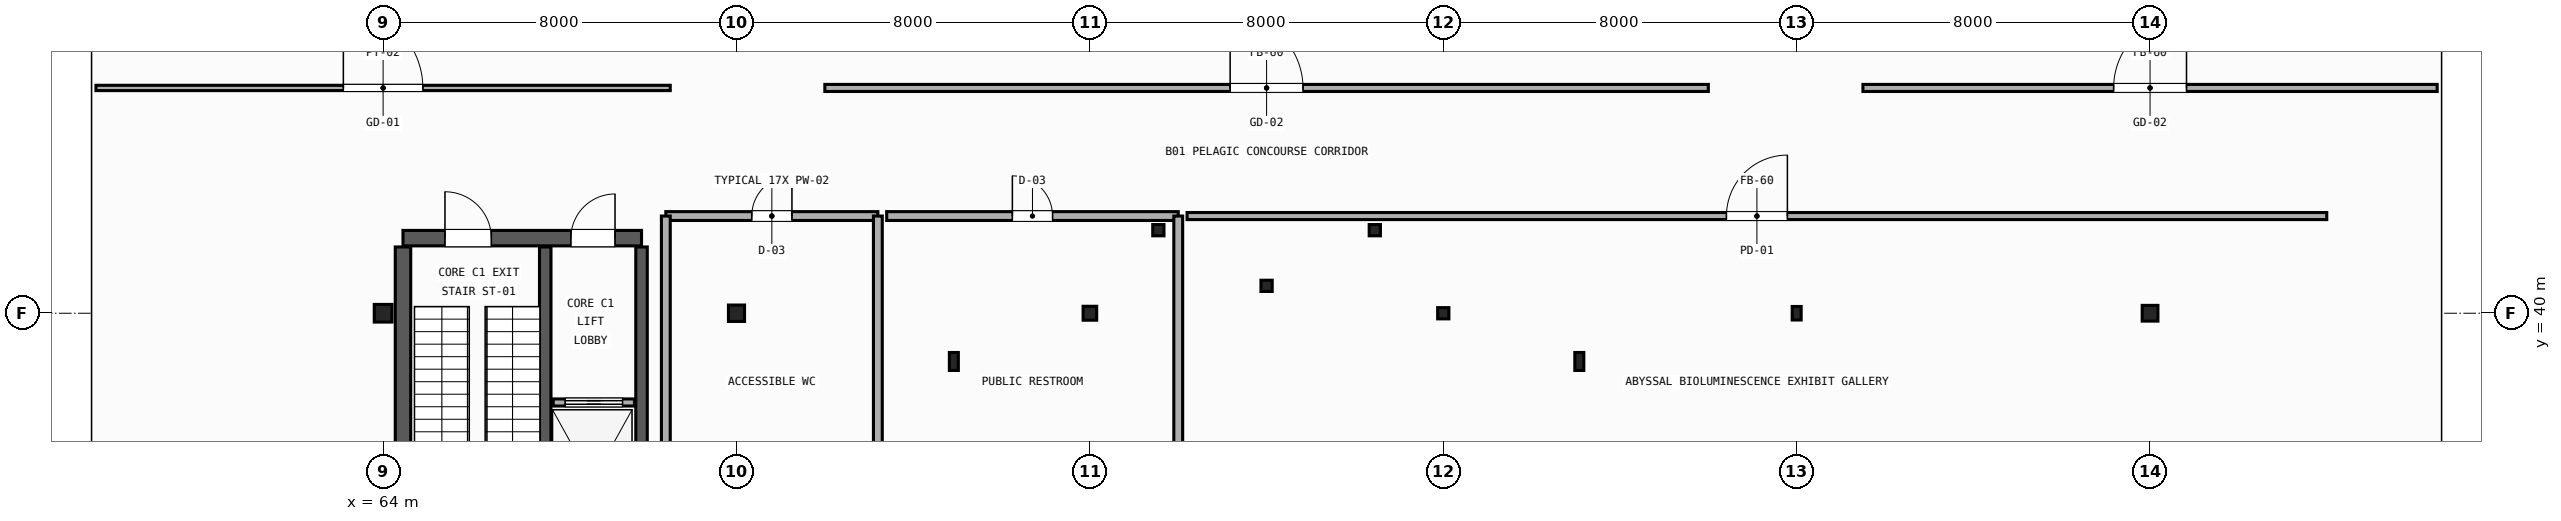
"""IFC4 building model, lengths in metres.
Left out: names, types, materials, properties, quantities, classifications, styles, units other than length and angle.
Written with IfcOpenShell. Run it as: python <this file> out.ifc"""

import sys

from ifc_helpers import new_model, si_unit, direction, frame, frame_2d, origin, origin_2d, place, context, subcontext, project, spatial, rectangle, hollow_rectangle, hollow_circle, i_section, extrude, element, fill, save


model = new_model("IFC4")
c1 = context("Model", 3, precision=1e-05, world=origin(), true_north=direction((0.0, 1.0)))
c2 = subcontext(c1, "Body", "Model", "MODEL_VIEW")
j1 = project(units=[si_unit("LENGTHUNIT", "METRE"), si_unit("PLANEANGLEUNIT", "RADIAN")], contexts=[c1])
p1 = place(None, origin())
s1 = spatial("IfcSite", under=j1, at=p1, CompositionType="ELEMENT")
p2 = place(p1, origin())
s2 = spatial("IfcBuilding", under=s1, at=p2, CompositionType="ELEMENT")
p3 = place(p2, frame((0.0, 0.0, -5.4)))
s3 = spatial("IfcBuildingStorey", under=s2, at=p3, CompositionType="ELEMENT", Elevation=-5.4)
p4 = place(p3, frame((64.0, 40.0, 0.0), z_axis=(0.0, 0.0, 1.0), x_axis=(1.0, 0.0, 0.0)))
e1 = element("IfcColumn", 1, at=p4, inside=s3, PredefinedType="COLUMN", context=c2, shape_type="SweptSolid", body=[
    extrude(i_section(OverallWidth=0.401, OverallDepth=0.399, WebThickness=0.025, FlangeThickness=0.04, FilletRadius=0.015, at=origin_2d()), origin(), (0.0, 0.0, 1.0), 5.04),
])
p5 = place(p3, frame((72.0, 40.0, 0.0), z_axis=(0.0, 0.0, 1.0), x_axis=(0.0, 1.0, 0.0)))
e2 = element("IfcColumn", 2, at=p5, inside=s3, PredefinedType="COLUMN", context=c2, shape_type="SweptSolid", body=[
    extrude(i_section(OverallWidth=0.371, OverallDepth=0.364, WebThickness=0.013, FlangeThickness=0.022, FilletRadius=0.015, at=origin_2d()), origin(), (0.0, 0.0, 1.0), 5.04),
])
p6 = place(p3, frame((80.0, 40.0, 0.0), z_axis=(0.0, 0.0, 1.0), x_axis=(1.0, 0.0, 0.0)))
e3 = element("IfcColumn", 3, at=p6, inside=s3, PredefinedType="COLUMN", context=c2, shape_type="SweptSolid", body=[
    extrude(i_section(OverallWidth=0.307, OverallDepth=0.315, WebThickness=0.012, FlangeThickness=0.019, FilletRadius=0.013, at=origin_2d()), origin(), (0.0, 0.0, 1.0), 5.04),
])
p7 = place(p3, frame((88.0, 40.0, 0.0), z_axis=(0.0, 0.0, 1.0), x_axis=(0.0, 1.0, 0.0)))
e4 = element("IfcColumn", 4, at=p7, inside=s3, PredefinedType="COLUMN", context=c2, shape_type="SweptSolid", body=[
    extrude(i_section(OverallWidth=0.254, OverallDepth=0.254, WebThickness=0.009, FlangeThickness=0.014, FilletRadius=0.011, at=origin_2d()), origin(), (0.0, 0.0, 1.0), 5.04),
])
p8 = place(p3, frame((96.0, 40.0, 0.0), z_axis=(0.0, 0.0, 1.0), x_axis=(1.0, 0.0, 0.0)))
e5 = element("IfcColumn", 5, at=p8, inside=s3, PredefinedType="COLUMN", context=c2, shape_type="SweptSolid", body=[
    extrude(hollow_rectangle(XDim=0.203, YDim=0.305, WallThickness=0.009, InnerFilletRadius=0.009, OuterFilletRadius=0.018, at=origin_2d()), origin(), (0.0, 0.0, 1.0), 5.04),
])
p9 = place(p3, frame((104.0, 40.0, 0.0), z_axis=(0.0, 0.0, 1.0), x_axis=(0.0, 1.0, 0.0)))
e6 = element("IfcColumn", 6, at=p9, inside=s3, PredefinedType="COLUMN", context=c2, shape_type="SweptSolid", body=[
    extrude(hollow_circle(Radius=0.178, WallThickness=0.012, at=origin_2d()), origin(), (0.0, 0.0, 1.0), 5.04),
])
for number, where, z_axis, x_axis in (
    (7, (76.92, 38.908, 0.0), (0.0, 0.0, 1.0), (1.0, 0.0, 0.0)),
    (8, (91.08, 38.908, 0.0), (0.0, 0.0, 1.0), (1.0, 0.0, 0.0)),
):
    element("IfcColumn", number, at=place(p3, frame(where, z_axis=z_axis, x_axis=x_axis)), inside=s3, PredefinedType="COLUMN", context=c2, shape_type="SweptSolid", body=[
        extrude(hollow_rectangle(XDim=0.203, YDim=0.406, WallThickness=0.012, InnerFilletRadius=0.012, OuterFilletRadius=0.024, at=origin_2d()), origin(), (0.0, 0.0, 1.0), 5.02),
    ])
p10 = place(p3, frame((64.45, 41.7, 0.0), z_axis=(0.0, 0.0, 1.0), x_axis=(1.0, 0.0, 0.0)))
e9 = element("IfcWall", 9, at=p10, inside=s3, PredefinedType="SHEAR", context=c2, shape_type="SweptSolid", body=[
    extrude(rectangle(XDim=5.4, YDim=0.35, at=frame_2d((2.7, 0.0))), origin(), (0.0, 0.0, 1.0), 5.03),
])
p11 = place(p10, frame((0.95, 0.0, 0.0)))
e10 = element("IfcOpeningElement", 10, at=p11, cuts=e9, PredefinedType="OPENING", context=c2, shape_type="SweptSolid", body=[
    extrude(rectangle(XDim=1.05, YDim=2.1, at=frame_2d((0.525, 1.05))), frame((0.0, 0.185, 0.0), z_axis=(0.0, -1.0, 0.0), x_axis=(1.0, 0.0, 0.0)), (0.0, 0.0, 1.0), 0.37),
])
p12 = place(p10, frame((3.8, 0.0, 0.0)))
e11 = element("IfcOpeningElement", 11, at=p12, cuts=e9, PredefinedType="OPENING", context=c2, shape_type="SweptSolid", body=[
    extrude(rectangle(XDim=1.0, YDim=2.15, at=frame_2d((0.5, 1.075))), frame((0.0, 0.185, 0.0), z_axis=(0.0, -1.0, 0.0), x_axis=(1.0, 0.0, 0.0)), (0.0, 0.0, 1.0), 0.37),
])
p13 = place(p3, frame((64.45, 34.55, 0.0), z_axis=(0.0, 0.0, 1.0), x_axis=(0.0, 1.0, 0.0)))
e12 = element("IfcWall", 12, at=p13, inside=s3, PredefinedType="SHEAR", context=c2, shape_type="SweptSolid", body=[
    extrude(rectangle(XDim=6.95, YDim=0.35, at=frame_2d((3.475, 0.0))), origin(), (0.0, 0.0, 1.0), 5.03),
])
for number, where, z_axis, x_axis in (
    (13, (69.85, 34.55, 0.0), (0.0, 0.0, 1.0), (0.0, 1.0, 0.0)),
    (14, (67.67, 34.55, 0.0), (0.0, 0.0, 1.0), (0.0, 1.0, 0.0)),
):
    element("IfcWall", number, at=place(p3, frame(where, z_axis=z_axis, x_axis=x_axis)), inside=s3, PredefinedType="SHEAR", context=c2, shape_type="SweptSolid", body=[
        extrude(rectangle(XDim=6.95, YDim=0.26, at=frame_2d((3.475, 0.0))), origin(), (0.0, 0.0, 1.0), 5.03),
    ])
p14 = place(p3, frame((67.85, 37.98, 0.0), z_axis=(0.0, 0.0, 1.0), x_axis=(1.0, 0.0, 0.0)))
e15 = element("IfcWall", 15, at=p14, inside=s3, PredefinedType="PARTITIONING", context=c2, shape_type="SweptSolid", body=[
    extrude(rectangle(XDim=1.84, YDim=0.16, at=frame_2d((0.92, 0.0))), origin(), (0.0, 0.0, 1.0), 3.6),
])
p15 = place(p14, frame((0.27, 0.0, 0.0)))
e16 = element("IfcOpeningElement", 16, at=p15, cuts=e15, PredefinedType="OPENING", context=c2, shape_type="SweptSolid", body=[
    extrude(rectangle(XDim=1.3, YDim=2.2, at=frame_2d((0.65, 1.1))), frame((0.0, 0.09, 0.0), z_axis=(0.0, -1.0, 0.0), x_axis=(1.0, 0.0, 0.0)), (0.0, 0.0, 1.0), 0.18),
])
for number, where, z_axis, x_axis in (
    (17, (81.55, 41.88, 0.0), (0.0, 0.0, 1.0), (1.0, 0.0, 0.0)),
    (18, (86.45, 41.88, 0.0), (0.0, 0.0, 1.0), (1.0, 0.0, 0.0)),
    (19, (84.0, 40.62, 0.0), (0.0, 0.0, 1.0), (1.0, 0.0, 0.0)),
):
    element("IfcColumn", number, at=place(p3, frame(where, z_axis=z_axis, x_axis=x_axis)), inside=s3, PredefinedType="COLUMN", context=c2, shape_type="SweptSolid", body=[
        extrude(hollow_rectangle(XDim=0.254, YDim=0.254, WallThickness=0.012, InnerFilletRadius=0.012, OuterFilletRadius=0.024, at=origin_2d()), origin(), (0.0, 0.0, 1.0), 5.06),
    ])
p16 = place(p3, frame((74.0, 45.1, 0.0), z_axis=(0.0, 0.0, 1.0), x_axis=(1.0, 0.0, 0.0)))
e20 = element("IfcWall", 20, at=p16, inside=s3, PredefinedType="PARTITIONING", context=c2, shape_type="SweptSolid", body=[
    extrude(rectangle(XDim=20.0, YDim=0.16, at=frame_2d((10.0, 0.0))), origin(), (0.0, 0.0, 1.0), 4.29),
])
p17 = place(p16, frame((9.175, 0.0, 0.0)))
e21 = element("IfcOpeningElement", 21, at=p17, cuts=e20, PredefinedType="OPENING", context=c2, shape_type="SweptSolid", body=[
    extrude(rectangle(XDim=1.65, YDim=2.35, at=frame_2d((0.825, 1.175))), frame((0.0, 0.09, 0.0), z_axis=(0.0, -1.0, 0.0), x_axis=(1.0, 0.0, 0.0)), (0.0, 0.0, 1.0), 0.18),
])
p18 = place(p3, frame((70.4, 42.2, 0.0), z_axis=(0.0, 0.0, 1.0), x_axis=(1.0, 0.0, 0.0)))
e22 = element("IfcWall", 22, at=p18, inside=s3, PredefinedType="PLUMBINGWALL", context=c2, shape_type="SweptSolid", body=[
    extrude(rectangle(XDim=4.8, YDim=0.2, at=frame_2d((2.4, 0.0))), origin(), (0.0, 0.0, 1.0), 4.29),
])
p19 = place(p18, frame((1.945, 0.0, 0.0)))
e23 = element("IfcOpeningElement", 23, at=p19, cuts=e22, PredefinedType="OPENING", context=c2, shape_type="SweptSolid", body=[
    extrude(rectangle(XDim=0.91, YDim=2.1, at=frame_2d((0.455, 1.05))), frame((0.0, 0.11, 0.0), z_axis=(0.0, -1.0, 0.0), x_axis=(1.0, 0.0, 0.0)), (0.0, 0.0, 1.0), 0.22),
])
for number, where, z_axis, x_axis in (
    (24, (70.4, 33.5, 0.0), (0.0, 0.0, 1.0), (0.0, 1.0, 0.0)),
    (25, (75.2, 33.5, 0.0), (0.0, 0.0, 1.0), (0.0, 1.0, 0.0)),
):
    element("IfcWall", number, at=place(p3, frame(where, z_axis=z_axis, x_axis=x_axis)), inside=s3, PredefinedType="PLUMBINGWALL", context=c2, shape_type="SweptSolid", body=[
        extrude(rectangle(XDim=8.7, YDim=0.2, at=frame_2d((4.35, 0.0))), origin(), (0.0, 0.0, 1.0), 4.29),
    ])
p20 = place(p3, frame((75.4, 42.2, 0.0), z_axis=(0.0, 0.0, 1.0), x_axis=(1.0, 0.0, 0.0)))
e26 = element("IfcWall", 26, at=p20, inside=s3, PredefinedType="PLUMBINGWALL", context=c2, shape_type="SweptSolid", body=[
    extrude(rectangle(XDim=6.6, YDim=0.2, at=frame_2d((3.3, 0.0))), origin(), (0.0, 0.0, 1.0), 4.29),
])
p21 = place(p20, frame((2.845, 0.0, 0.0)))
e27 = element("IfcOpeningElement", 27, at=p21, cuts=e26, PredefinedType="OPENING", context=c2, shape_type="SweptSolid", body=[
    extrude(rectangle(XDim=0.91, YDim=2.1, at=frame_2d((0.455, 1.05))), frame((0.0, 0.11, 0.0), z_axis=(0.0, -1.0, 0.0), x_axis=(1.0, 0.0, 0.0)), (0.0, 0.0, 1.0), 0.22),
])
p22 = place(p3, frame((82.0, 33.5, 0.0), z_axis=(0.0, 0.0, 1.0), x_axis=(0.0, 1.0, 0.0)))
e28 = element("IfcWall", 28, at=p22, inside=s3, PredefinedType="PLUMBINGWALL", context=c2, shape_type="SweptSolid", body=[
    extrude(rectangle(XDim=8.7, YDim=0.2, at=frame_2d((4.35, 0.0))), origin(), (0.0, 0.0, 1.0), 4.29),
])
p23 = place(p3, frame((82.2, 42.2, 0.0), z_axis=(0.0, 0.0, 1.0), x_axis=(1.0, 0.0, 0.0)))
e29 = element("IfcWall", 29, at=p23, inside=s3, PredefinedType="PARTITIONING", context=c2, shape_type="SweptSolid", body=[
    extrude(rectangle(XDim=25.8, YDim=0.16, at=frame_2d((12.9, 0.0))), origin(), (0.0, 0.0, 1.0), 4.29),
])
p24 = place(p23, frame((12.21, 0.0, 0.0)))
e30 = element("IfcOpeningElement", 30, at=p24, cuts=e29, PredefinedType="OPENING", context=c2, shape_type="SweptSolid", body=[
    extrude(rectangle(XDim=1.38, YDim=2.25, at=frame_2d((0.69, 1.125))), frame((0.0, 0.09, 0.0), z_axis=(0.0, -1.0, 0.0), x_axis=(1.0, 0.0, 0.0)), (0.0, 0.0, 1.0), 0.18),
])
p25 = place(p3, frame((57.5, 45.1, 0.0), z_axis=(0.0, 0.0, 1.0), x_axis=(1.0, 0.0, 0.0)))
e31 = element("IfcWall", 31, at=p25, inside=s3, PredefinedType="PARTITIONING", context=c2, shape_type="SweptSolid", body=[
    extrude(rectangle(XDim=13.0, YDim=0.12, at=frame_2d((6.5, 0.0))), origin(), (0.0, 0.0, 1.0), 4.29),
])
p26 = place(p25, frame((5.6, 0.0, 0.0)))
e32 = element("IfcOpeningElement", 32, at=p26, cuts=e31, PredefinedType="OPENING", context=c2, shape_type="SweptSolid", body=[
    extrude(rectangle(XDim=1.8, YDim=2.4, at=frame_2d((0.9, 1.2))), frame((0.0, 0.07, 0.0), z_axis=(0.0, -1.0, 0.0), x_axis=(1.0, 0.0, 0.0)), (0.0, 0.0, 1.0), 0.14),
])
p27 = place(p3, frame((97.5, 45.1, 0.0), z_axis=(0.0, 0.0, 1.0), x_axis=(1.0, 0.0, 0.0)))
e33 = element("IfcWall", 33, at=p27, inside=s3, PredefinedType="PARTITIONING", context=c2, shape_type="SweptSolid", body=[
    extrude(rectangle(XDim=13.0, YDim=0.16, at=frame_2d((6.5, 0.0))), origin(), (0.0, 0.0, 1.0), 4.29),
])
p28 = place(p27, frame((5.675, 0.0, 0.0)))
e34 = element("IfcOpeningElement", 34, at=p28, cuts=e33, PredefinedType="OPENING", context=c2, shape_type="SweptSolid", body=[
    extrude(rectangle(XDim=1.65, YDim=2.35, at=frame_2d((0.825, 1.175))), frame((0.0, 0.09, 0.0), z_axis=(0.0, -1.0, 0.0), x_axis=(1.0, 0.0, 0.0)), (0.0, 0.0, 1.0), 0.18),
])
p29 = place(p15, origin())
e35 = element("IfcDoor", 35, at=p29, inside=s3, OperationType="SLIDING_TO_LEFT", PredefinedType="DOOR", context=c2, shape_type="SweptSolid", body=[
    extrude(rectangle(XDim=1.3, YDim=2.2, at=frame_2d((0.65, 1.1))), frame((0.0, 0.025, 0.0), z_axis=(0.0, -1.0, 0.0), x_axis=(1.0, 0.0, 0.0)), (0.0, 0.0, 1.0), 0.05),
])
fill(e16, e35)
p30 = place(p11, origin())
e36 = element("IfcDoor", 36, at=p30, inside=s3, OperationType="SINGLE_SWING_LEFT", PredefinedType="DOOR", context=c2, shape_type="SweptSolid", body=[
    extrude(rectangle(XDim=1.05, YDim=2.1, at=frame_2d((0.525, 1.05))), frame((0.0, 0.025, 0.0), z_axis=(0.0, -1.0, 0.0), x_axis=(1.0, 0.0, 0.0)), (0.0, 0.0, 1.0), 0.05),
])
fill(e10, e36)
p31 = place(p12, origin())
e37 = element("IfcDoor", 37, at=p31, inside=s3, OperationType="SINGLE_SWING_RIGHT", PredefinedType="DOOR", context=c2, shape_type="SweptSolid", body=[
    extrude(rectangle(XDim=1.0, YDim=2.15, at=frame_2d((0.5, 1.075))), frame((0.0, 0.025, 0.0), z_axis=(0.0, -1.0, 0.0), x_axis=(1.0, 0.0, 0.0)), (0.0, 0.0, 1.0), 0.05),
])
fill(e11, e37)
p32 = place(p17, origin())
e38 = element("IfcDoor", 38, at=p32, inside=s3, OperationType="SINGLE_SWING_LEFT", PredefinedType="DOOR", context=c2, shape_type="SweptSolid", body=[
    extrude(rectangle(XDim=1.65, YDim=2.35, at=frame_2d((0.825, 1.175))), frame((0.0, 0.025, 0.0), z_axis=(0.0, -1.0, 0.0), x_axis=(1.0, 0.0, 0.0)), (0.0, 0.0, 1.0), 0.05),
])
fill(e21, e38)
p33 = place(p19, origin())
e39 = element("IfcDoor", 39, at=p33, inside=s3, OperationType="SINGLE_SWING_RIGHT", PredefinedType="DOOR", context=c2, shape_type="SweptSolid", body=[
    extrude(rectangle(XDim=0.91, YDim=2.1, at=frame_2d((0.455, 1.05))), frame((0.0, 0.025, 0.0), z_axis=(0.0, -1.0, 0.0), x_axis=(1.0, 0.0, 0.0)), (0.0, 0.0, 1.0), 0.05),
])
fill(e23, e39)
p34 = place(p21, origin())
e40 = element("IfcDoor", 40, at=p34, inside=s3, OperationType="SINGLE_SWING_LEFT", PredefinedType="DOOR", context=c2, shape_type="SweptSolid", body=[
    extrude(rectangle(XDim=0.91, YDim=2.1, at=frame_2d((0.455, 1.05))), frame((0.0, 0.025, 0.0), z_axis=(0.0, -1.0, 0.0), x_axis=(1.0, 0.0, 0.0)), (0.0, 0.0, 1.0), 0.05),
])
fill(e27, e40)
p35 = place(p24, origin())
e41 = element("IfcDoor", 41, at=p35, inside=s3, OperationType="SINGLE_SWING_RIGHT", PredefinedType="DOOR", context=c2, shape_type="SweptSolid", body=[
    extrude(rectangle(XDim=1.38, YDim=2.25, at=frame_2d((0.69, 1.125))), frame((0.0, 0.025, 0.0), z_axis=(0.0, -1.0, 0.0), x_axis=(1.0, 0.0, 0.0)), (0.0, 0.0, 1.0), 0.05),
])
fill(e30, e41)
p36 = place(p26, origin())
e42 = element("IfcDoor", 42, at=p36, inside=s3, OperationType="SINGLE_SWING_LEFT", PredefinedType="DOOR", context=c2, shape_type="SweptSolid", body=[
    extrude(rectangle(XDim=1.8, YDim=2.4, at=frame_2d((0.9, 1.2))), frame((0.0, 0.025, 0.0), z_axis=(0.0, -1.0, 0.0), x_axis=(1.0, 0.0, 0.0)), (0.0, 0.0, 1.0), 0.05),
])
fill(e32, e42)
p37 = place(p28, origin())
e43 = element("IfcDoor", 43, at=p37, inside=s3, OperationType="SINGLE_SWING_RIGHT", PredefinedType="DOOR", context=c2, shape_type="SweptSolid", body=[
    extrude(rectangle(XDim=1.65, YDim=2.35, at=frame_2d((0.825, 1.175))), frame((0.0, 0.025, 0.0), z_axis=(0.0, -1.0, 0.0), x_axis=(1.0, 0.0, 0.0)), (0.0, 0.0, 1.0), 0.05),
])
fill(e34, e43)
save(model, sys.argv[1])
